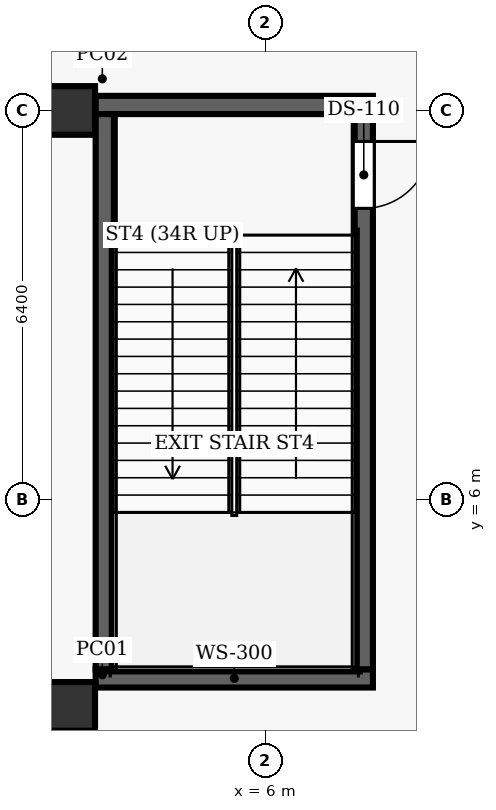
"""IFC4 building model, lengths in metres.
Left out: names, types, materials, properties, quantities, classifications, styles, units other than length and angle.
Written with IfcOpenShell. Run it as: python <this file> out.ifc"""

import sys

from ifc_helpers import new_model, si_unit, direction, frame, frame_2d, origin, origin_2d, place, context, subcontext, project, spatial, rectangle, extrude, element, fill, save


model = new_model("IFC4")
c1 = context("Model", 3, precision=1e-05, world=origin(), true_north=direction((0.0, 1.0)))
c2 = subcontext(c1, "Body", "Model", "MODEL_VIEW")
j1 = project(units=[si_unit("LENGTHUNIT", "METRE"), si_unit("PLANEANGLEUNIT", "RADIAN")], contexts=[c1])
p1 = place(None, origin())
s1 = spatial("IfcSite", under=j1, at=p1, CompositionType="ELEMENT")
p2 = place(p1, origin())
s2 = spatial("IfcBuilding", under=s1, at=p2, CompositionType="ELEMENT")
p3 = place(p2, frame((0.0, 0.0, 24.0)))
s3 = spatial("IfcBuildingStorey", under=s2, at=p3, CompositionType="ELEMENT", Elevation=24.0)
for number, where, z_axis, x_axis in (
    (1, (2.8, 2.6, 0.0), (0.0, 0.0, 1.0), (1.0, 0.0, 0.0)),
    (2, (2.8, 12.4, 0.0), (0.0, 0.0, 1.0), (1.0, 0.0, 0.0)),
):
    element("IfcColumn", number, at=place(p3, frame(where, z_axis=z_axis, x_axis=x_axis)), inside=s3, PredefinedType="COLUMN", context=c2, shape_type="SweptSolid", body=[
        extrude(rectangle(XDim=0.8, YDim=0.8, at=origin_2d()), origin(), (0.0, 0.0, 1.0), 6.0),
    ])
for number, where, z_axis, x_axis in (
    (3, (3.21, 3.06, 0.0), (0.0, 0.0, 1.0), (1.0, 0.0, 0.0)),
    (4, (3.21, 12.49, 0.0), (0.0, 0.0, 1.0), (1.0, 0.0, 0.0)),
):
    element("IfcWall", number, at=place(p3, frame(where, z_axis=z_axis, x_axis=x_axis)), inside=s3, PredefinedType="SHEAR", context=c2, shape_type="SweptSolid", body=[
        extrude(rectangle(XDim=4.56, YDim=0.3, at=frame_2d((2.28, 0.0))), origin(), (0.0, 0.0, 1.0), 6.0),
    ])
p4 = place(p3, frame((3.36, 3.21, 0.0), z_axis=(0.0, 0.0, 1.0), x_axis=(0.0, 1.0, 0.0)))
e5 = element("IfcWall", 5, at=p4, inside=s3, PredefinedType="SHEAR", context=c2, shape_type="SweptSolid", body=[
    extrude(rectangle(XDim=9.13, YDim=0.3, at=frame_2d((4.565, 0.0))), origin(), (0.0, 0.0, 1.0), 6.0),
])
p5 = place(p3, frame((7.62, 12.34, 0.0), z_axis=(0.0, 0.0, 1.0), x_axis=(0.0, -1.0, 0.0)))
e6 = element("IfcWall", 6, at=p5, inside=s3, PredefinedType="SHEAR", context=c2, shape_type="SweptSolid", body=[
    extrude(rectangle(XDim=9.13, YDim=0.3, at=frame_2d((4.565, 0.0))), origin(), (0.0, 0.0, 1.0), 6.0),
])
p6 = place(p5, frame((0.45, 0.0, 0.0)))
e7 = element("IfcOpeningElement", 7, at=p6, cuts=e6, PredefinedType="OPENING", context=c2, shape_type="SweptSolid", body=[
    extrude(rectangle(XDim=1.1, YDim=2.15, at=frame_2d((0.55, 1.075))), frame((0.0, 0.16, 0.0), z_axis=(0.0, -1.0, 0.0), x_axis=(1.0, 0.0, 0.0)), (0.0, 0.0, 1.0), 0.32),
])
p7 = place(p6, origin())
e8 = element("IfcDoor", 8, at=p7, inside=s3, OperationType="SINGLE_SWING_LEFT", PredefinedType="DOOR", context=c2, shape_type="SweptSolid", body=[
    extrude(rectangle(XDim=1.1, YDim=2.15, at=frame_2d((0.55, 1.075))), frame((0.0, 0.025, 0.0), z_axis=(0.0, -1.0, 0.0), x_axis=(1.0, 0.0, 0.0)), (0.0, 0.0, 1.0), 0.05),
])
fill(e7, e8)
save(model, sys.argv[1])
